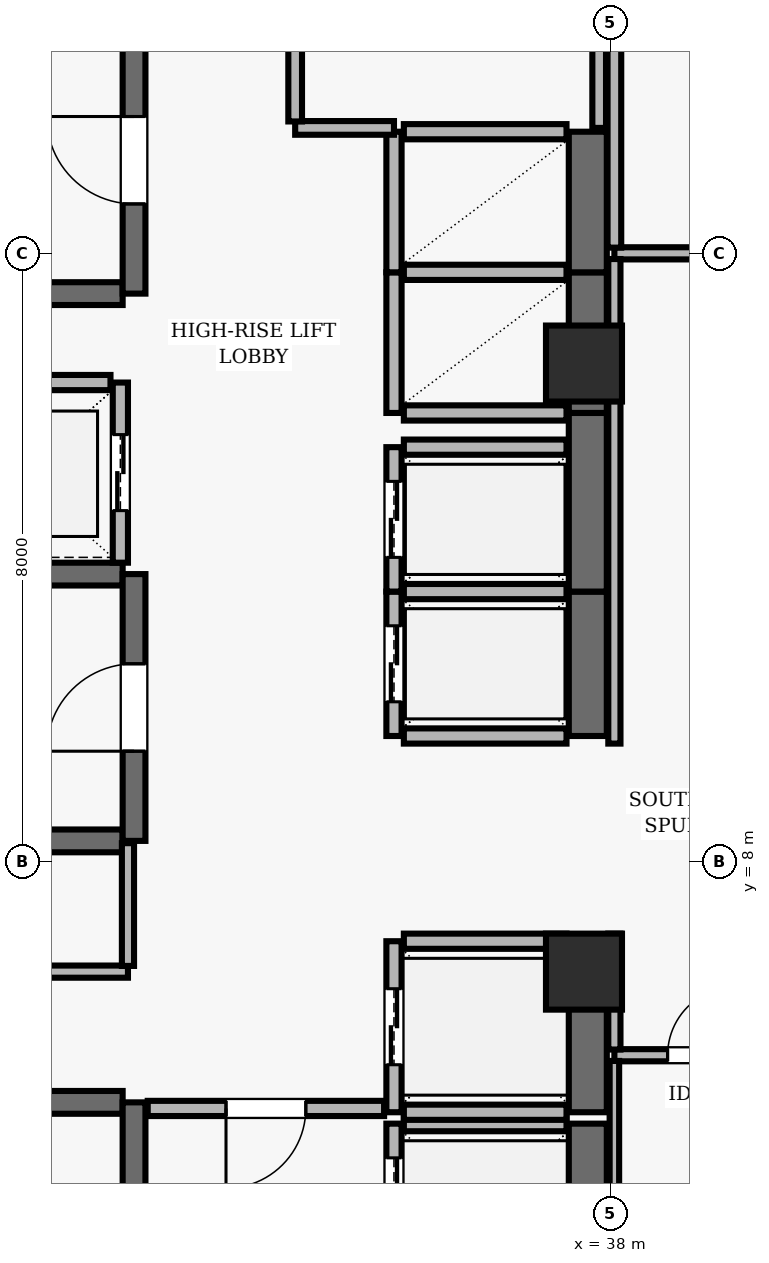
"""IFC4 building model, lengths in metres.
Left out: names, types, materials, properties, quantities, classifications, styles, units other than length and angle.
Written with IfcOpenShell. Run it as: python <this file> out.ifc"""

import sys

from ifc_helpers import new_model, si_unit, direction, frame, frame_2d, origin, origin_2d, place, context, subcontext, project, spatial, rectangle, extrude, element, fill, save


model = new_model("IFC4")
c1 = context("Model", 3, precision=1e-05, world=origin(), true_north=direction((0.0, 1.0)))
c2 = subcontext(c1, "Body", "Model", "MODEL_VIEW")
j1 = project(units=[si_unit("LENGTHUNIT", "METRE"), si_unit("PLANEANGLEUNIT", "RADIAN")], contexts=[c1])
p1 = place(None, origin())
s1 = spatial("IfcSite", under=j1, at=p1, CompositionType="ELEMENT")
p2 = place(p1, origin())
s2 = spatial("IfcBuilding", under=s1, at=p2, CompositionType="ELEMENT")
p3 = place(p2, frame((0.0, 0.0, 222.6)))
s3 = spatial("IfcBuildingStorey", under=s2, at=p3, CompositionType="ELEMENT", Elevation=222.6)
for number, where, z_axis, x_axis in (
    (1, (37.65, 6.55, 0.0), (0.0, 0.0, 1.0), (1.0, 0.0, 0.0)),
    (2, (37.65, 14.55, 0.0), (0.0, 0.0, 1.0), (1.0, 0.0, 0.0)),
):
    element("IfcColumn", number, at=place(p3, frame(where, z_axis=z_axis, x_axis=x_axis)), inside=s3, PredefinedType="COLUMN", context=c2, shape_type="SweptSolid", body=[
        extrude(rectangle(XDim=1.0, YDim=1.0, at=origin_2d()), origin(), (0.0, 0.0, 1.0), 3.9),
    ])
p4 = place(p3, frame((31.58, 4.83, 0.0), z_axis=(0.0, 0.0, 1.0), x_axis=(-1.0, 0.0, 0.0)))
e3 = element("IfcWall", 3, at=p4, inside=s3, PredefinedType="SHEAR", context=c2, shape_type="SweptSolid", body=[
    extrude(rectangle(XDim=8.36, YDim=0.3, at=frame_2d((4.18, 0.0))), origin(), (0.0, 0.0, 1.0), 3.69),
])
p5 = place(p3, frame((31.73, 0.96, 0.0), z_axis=(0.0, 0.0, 1.0), x_axis=(0.0, 1.0, 0.0)))
e4 = element("IfcWall", 4, at=p5, inside=s3, PredefinedType="SHEAR", context=c2, shape_type="SweptSolid", body=[
    extrude(rectangle(XDim=3.87, YDim=0.3, at=frame_2d((1.935, 0.0))), origin(), (0.0, 0.0, 1.0), 3.69),
])
p6 = place(p5, frame((1.54, 0.0, 0.0)))
e5 = element("IfcOpeningElement", 5, at=p6, cuts=e4, PredefinedType="OPENING", context=c2, shape_type="SweptSolid", body=[
    extrude(rectangle(XDim=1.15, YDim=2.15, at=frame_2d((0.575, 1.075))), frame((0.0, 0.16, 0.0), z_axis=(0.0, -1.0, 0.0), x_axis=(1.0, 0.0, 0.0)), (0.0, 0.0, 1.0), 0.32),
])
p7 = place(p3, frame((23.22, 15.47, 0.0), z_axis=(0.0, 0.0, 1.0), x_axis=(1.0, 0.0, 0.0)))
e6 = element("IfcWall", 6, at=p7, inside=s3, PredefinedType="SHEAR", context=c2, shape_type="SweptSolid", body=[
    extrude(rectangle(XDim=8.36, YDim=0.3, at=frame_2d((4.18, 0.0))), origin(), (0.0, 0.0, 1.0), 3.69),
])
p8 = place(p3, frame((31.73, 15.47, 0.0), z_axis=(0.0, 0.0, 1.0), x_axis=(0.0, 1.0, 0.0)))
e7 = element("IfcWall", 7, at=p8, inside=s3, PredefinedType="SHEAR", context=c2, shape_type="SweptSolid", body=[
    extrude(rectangle(XDim=3.51, YDim=0.3, at=frame_2d((1.755, 0.0))), origin(), (0.0, 0.0, 1.0), 3.69),
])
p9 = place(p8, frame((1.18, 0.0, 0.0)))
e8 = element("IfcOpeningElement", 8, at=p9, cuts=e7, PredefinedType="OPENING", context=c2, shape_type="SweptSolid", body=[
    extrude(rectangle(XDim=1.15, YDim=2.15, at=frame_2d((0.575, 1.075))), frame((0.0, 0.16, 0.0), z_axis=(0.0, -1.0, 0.0), x_axis=(1.0, 0.0, 0.0)), (0.0, 0.0, 1.0), 0.32),
])
for number, where, z_axis, x_axis in (
    (9, (31.58, 11.78, 0.0), (0.0, 0.0, 1.0), (-1.0, 0.0, 0.0)),
    (10, (23.22, 8.27, 0.0), (0.0, 0.0, 1.0), (1.0, 0.0, 0.0)),
):
    element("IfcWall", number, at=place(p3, frame(where, z_axis=z_axis, x_axis=x_axis)), inside=s3, PredefinedType="SHEAR", context=c2, shape_type="SweptSolid", body=[
        extrude(rectangle(XDim=8.36, YDim=0.3, at=frame_2d((4.18, 0.0))), origin(), (0.0, 0.0, 1.0), 3.69),
    ])
p10 = place(p3, frame((31.73, 8.27, 0.0), z_axis=(0.0, 0.0, 1.0), x_axis=(0.0, 1.0, 0.0)))
e11 = element("IfcWall", 11, at=p10, inside=s3, PredefinedType="SHEAR", context=c2, shape_type="SweptSolid", body=[
    extrude(rectangle(XDim=3.51, YDim=0.3, at=frame_2d((1.755, 0.0))), origin(), (0.0, 0.0, 1.0), 3.69),
])
p11 = place(p10, frame((1.18, 0.0, 0.0)))
e12 = element("IfcOpeningElement", 12, at=p11, cuts=e11, PredefinedType="OPENING", context=c2, shape_type="SweptSolid", body=[
    extrude(rectangle(XDim=1.15, YDim=2.15, at=frame_2d((0.575, 1.075))), frame((0.0, 0.16, 0.0), z_axis=(0.0, -1.0, 0.0), x_axis=(1.0, 0.0, 0.0)), (0.0, 0.0, 1.0), 0.32),
])
p12 = place(p3, frame((35.15, 4.55, 0.0), z_axis=(0.0, 0.0, 1.0), x_axis=(0.0, -1.0, 0.0)))
e13 = element("IfcWall", 13, at=p12, inside=s3, PredefinedType="SOLIDWALL", context=c2, shape_type="SweptSolid", body=[
    extrude(rectangle(XDim=2.1, YDim=0.2, at=frame_2d((1.05, 0.0))), origin(), (0.0, 0.0, 1.0), 3.69),
])
p13 = place(p12, frame((0.45, 0.0, 0.0)))
e14 = element("IfcOpeningElement", 14, at=p13, cuts=e13, PredefinedType="OPENING", context=c2, shape_type="SweptSolid", body=[
    extrude(rectangle(XDim=1.2, YDim=2.15, at=frame_2d((0.6, 1.075))), frame((0.0, 0.11, 0.0), z_axis=(0.0, -1.0, 0.0), x_axis=(1.0, 0.0, 0.0)), (0.0, 0.0, 1.0), 0.22),
])
p14 = place(p3, frame((37.7, 2.45, 0.0), z_axis=(0.0, 0.0, 1.0), x_axis=(0.0, 1.0, 0.0)))
e15 = element("IfcWall", 15, at=p14, inside=s3, PredefinedType="SHEAR", context=c2, shape_type="SweptSolid", body=[
    extrude(rectangle(XDim=2.1, YDim=0.5, at=frame_2d((1.05, 0.0))), origin(), (0.0, 0.0, 1.0), 3.69),
])
p15 = place(p3, frame((37.42, 4.55, 0.0), z_axis=(0.0, 0.0, 1.0), x_axis=(-1.0, 0.0, 0.0)))
e16 = element("IfcWall", 16, at=p15, inside=s3, PredefinedType="SOLIDWALL", context=c2, shape_type="SweptSolid", body=[
    extrude(rectangle(XDim=2.14, YDim=0.2, at=frame_2d((1.07, 0.0))), origin(), (0.0, 0.0, 1.0), 3.69),
])
p16 = place(p3, frame((35.15, 6.95, 0.0), z_axis=(0.0, 0.0, 1.0), x_axis=(0.0, -1.0, 0.0)))
e17 = element("IfcWall", 17, at=p16, inside=s3, PredefinedType="SOLIDWALL", context=c2, shape_type="SweptSolid", body=[
    extrude(rectangle(XDim=2.25, YDim=0.2, at=frame_2d((1.125, 0.0))), origin(), (0.0, 0.0, 1.0), 3.69),
])
p17 = place(p16, frame((0.625, 0.0, 0.0)))
e18 = element("IfcOpeningElement", 18, at=p17, cuts=e17, PredefinedType="OPENING", context=c2, shape_type="SweptSolid", body=[
    extrude(rectangle(XDim=1.0, YDim=2.1, at=frame_2d((0.5, 1.05))), frame((0.0, 0.11, 0.0), z_axis=(0.0, -1.0, 0.0), x_axis=(1.0, 0.0, 0.0)), (0.0, 0.0, 1.0), 0.22),
])
p18 = place(p3, frame((37.7, 4.7, 0.0), z_axis=(0.0, 0.0, 1.0), x_axis=(0.0, 1.0, 0.0)))
e19 = element("IfcWall", 19, at=p18, inside=s3, PredefinedType="SHEAR", context=c2, shape_type="SweptSolid", body=[
    extrude(rectangle(XDim=2.25, YDim=0.5, at=frame_2d((1.125, 0.0))), origin(), (0.0, 0.0, 1.0), 3.69),
])
for number, where, z_axis, x_axis in (
    (20, (35.28, 4.7, 0.0), (0.0, 0.0, 1.0), (1.0, 0.0, 0.0)),
    (21, (37.42, 6.95, 0.0), (0.0, 0.0, 1.0), (-1.0, 0.0, 0.0)),
):
    element("IfcWall", number, at=place(p3, frame(where, z_axis=z_axis, x_axis=x_axis)), inside=s3, PredefinedType="SOLIDWALL", context=c2, shape_type="SweptSolid", body=[
        extrude(rectangle(XDim=2.14, YDim=0.2, at=frame_2d((1.07, 0.0))), origin(), (0.0, 0.0, 1.0), 3.69),
    ])
p19 = place(p3, frame((35.15, 11.55, 0.0), z_axis=(0.0, 0.0, 1.0), x_axis=(0.0, -1.0, 0.0)))
e22 = element("IfcWall", 22, at=p19, inside=s3, PredefinedType="SOLIDWALL", context=c2, shape_type="SweptSolid", body=[
    extrude(rectangle(XDim=1.9, YDim=0.2, at=frame_2d((0.95, 0.0))), origin(), (0.0, 0.0, 1.0), 3.69),
])
p20 = place(p19, frame((0.45, 0.0, 0.0)))
e23 = element("IfcOpeningElement", 23, at=p20, cuts=e22, PredefinedType="OPENING", context=c2, shape_type="SweptSolid", body=[
    extrude(rectangle(XDim=1.0, YDim=2.1, at=frame_2d((0.5, 1.05))), frame((0.0, 0.11, 0.0), z_axis=(0.0, -1.0, 0.0), x_axis=(1.0, 0.0, 0.0)), (0.0, 0.0, 1.0), 0.22),
])
p21 = place(p3, frame((37.7, 9.65, 0.0), z_axis=(0.0, 0.0, 1.0), x_axis=(0.0, 1.0, 0.0)))
e24 = element("IfcWall", 24, at=p21, inside=s3, PredefinedType="SHEAR", context=c2, shape_type="SweptSolid", body=[
    extrude(rectangle(XDim=1.9, YDim=0.5, at=frame_2d((0.95, 0.0))), origin(), (0.0, 0.0, 1.0), 3.69),
])
for number, where, z_axis, x_axis in (
    (25, (35.28, 9.65, 0.0), (0.0, 0.0, 1.0), (1.0, 0.0, 0.0)),
    (26, (37.42, 11.55, 0.0), (0.0, 0.0, 1.0), (-1.0, 0.0, 0.0)),
):
    element("IfcWall", number, at=place(p3, frame(where, z_axis=z_axis, x_axis=x_axis)), inside=s3, PredefinedType="SOLIDWALL", context=c2, shape_type="SweptSolid", body=[
        extrude(rectangle(XDim=2.14, YDim=0.2, at=frame_2d((1.07, 0.0))), origin(), (0.0, 0.0, 1.0), 3.69),
    ])
p22 = place(p3, frame((35.15, 13.45, 0.0), z_axis=(0.0, 0.0, 1.0), x_axis=(0.0, -1.0, 0.0)))
e27 = element("IfcWall", 27, at=p22, inside=s3, PredefinedType="SOLIDWALL", context=c2, shape_type="SweptSolid", body=[
    extrude(rectangle(XDim=1.9, YDim=0.2, at=frame_2d((0.95, 0.0))), origin(), (0.0, 0.0, 1.0), 3.69),
])
p23 = place(p22, frame((0.45, 0.0, 0.0)))
e28 = element("IfcOpeningElement", 28, at=p23, cuts=e27, PredefinedType="OPENING", context=c2, shape_type="SweptSolid", body=[
    extrude(rectangle(XDim=1.0, YDim=2.1, at=frame_2d((0.5, 1.05))), frame((0.0, 0.11, 0.0), z_axis=(0.0, -1.0, 0.0), x_axis=(1.0, 0.0, 0.0)), (0.0, 0.0, 1.0), 0.22),
])
p24 = place(p3, frame((37.7, 11.55, 0.0), z_axis=(0.0, 0.0, 1.0), x_axis=(0.0, 1.0, 0.0)))
e29 = element("IfcWall", 29, at=p24, inside=s3, PredefinedType="SHEAR", context=c2, shape_type="SweptSolid", body=[
    extrude(rectangle(XDim=2.35, YDim=0.5, at=frame_2d((1.175, 0.0))), origin(), (0.0, 0.0, 1.0), 3.69),
])
p25 = place(p3, frame((37.42, 13.45, 0.0), z_axis=(0.0, 0.0, 1.0), x_axis=(-1.0, 0.0, 0.0)))
e30 = element("IfcWall", 30, at=p25, inside=s3, PredefinedType="SOLIDWALL", context=c2, shape_type="SweptSolid", body=[
    extrude(rectangle(XDim=2.14, YDim=0.2, at=frame_2d((1.07, 0.0))), origin(), (0.0, 0.0, 1.0), 3.69),
])
p26 = place(p3, frame((31.55, 11.93, 0.0), z_axis=(0.0, 0.0, 1.0), x_axis=(0.0, 1.0, 0.0)))
e31 = element("IfcWall", 31, at=p26, inside=s3, PredefinedType="SOLIDWALL", context=c2, shape_type="SweptSolid", body=[
    extrude(rectangle(XDim=2.37, YDim=0.2, at=frame_2d((1.185, 0.0))), origin(), (0.0, 0.0, 1.0), 3.69),
])
p27 = place(p26, frame((0.685, 0.0, 0.0)))
e32 = element("IfcOpeningElement", 32, at=p27, cuts=e31, PredefinedType="OPENING", context=c2, shape_type="SweptSolid", body=[
    extrude(rectangle(XDim=1.0, YDim=2.1, at=frame_2d((0.5, 1.05))), frame((0.0, 0.11, 0.0), z_axis=(0.0, -1.0, 0.0), x_axis=(1.0, 0.0, 0.0)), (0.0, 0.0, 1.0), 0.22),
])
p28 = place(p3, frame((31.42, 14.3, 0.0), z_axis=(0.0, 0.0, 1.0), x_axis=(-1.0, 0.0, 0.0)))
e33 = element("IfcWall", 33, at=p28, inside=s3, PredefinedType="SOLIDWALL", context=c2, shape_type="SweptSolid", body=[
    extrude(rectangle(XDim=2.44, YDim=0.2, at=frame_2d((1.22, 0.0))), origin(), (0.0, 0.0, 1.0), 3.69),
])
p29 = place(p3, frame((35.15, 15.75, 0.0), z_axis=(0.0, 0.0, 1.0), x_axis=(0.0, -1.0, 0.0)))
e34 = element("IfcWall", 34, at=p29, inside=s3, PredefinedType="SOLIDWALL", context=c2, shape_type="SweptSolid", body=[
    extrude(rectangle(XDim=1.85, YDim=0.2, at=frame_2d((0.925, 0.0))), origin(), (0.0, 0.0, 1.0), 3.69),
])
p30 = place(p3, frame((37.7, 13.9, 0.0), z_axis=(0.0, 0.0, 1.0), x_axis=(0.0, 1.0, 0.0)))
e35 = element("IfcWall", 35, at=p30, inside=s3, PredefinedType="SHEAR", context=c2, shape_type="SweptSolid", body=[
    extrude(rectangle(XDim=1.85, YDim=0.5, at=frame_2d((0.925, 0.0))), origin(), (0.0, 0.0, 1.0), 3.69),
])
for number, where, z_axis, x_axis in (
    (36, (35.28, 13.9, 0.0), (0.0, 0.0, 1.0), (1.0, 0.0, 0.0)),
    (37, (37.42, 15.75, 0.0), (0.0, 0.0, 1.0), (-1.0, 0.0, 0.0)),
):
    element("IfcWall", number, at=place(p3, frame(where, z_axis=z_axis, x_axis=x_axis)), inside=s3, PredefinedType="SOLIDWALL", context=c2, shape_type="SweptSolid", body=[
        extrude(rectangle(XDim=2.14, YDim=0.2, at=frame_2d((1.07, 0.0))), origin(), (0.0, 0.0, 1.0), 3.69),
    ])
p31 = place(p3, frame((35.15, 17.6, 0.0), z_axis=(0.0, 0.0, 1.0), x_axis=(0.0, -1.0, 0.0)))
e38 = element("IfcWall", 38, at=p31, inside=s3, PredefinedType="SOLIDWALL", context=c2, shape_type="SweptSolid", body=[
    extrude(rectangle(XDim=1.85, YDim=0.2, at=frame_2d((0.925, 0.0))), origin(), (0.0, 0.0, 1.0), 3.69),
])
p32 = place(p3, frame((37.7, 15.75, 0.0), z_axis=(0.0, 0.0, 1.0), x_axis=(0.0, 1.0, 0.0)))
e39 = element("IfcWall", 39, at=p32, inside=s3, PredefinedType="SHEAR", context=c2, shape_type="SweptSolid", body=[
    extrude(rectangle(XDim=1.85, YDim=0.5, at=frame_2d((0.925, 0.0))), origin(), (0.0, 0.0, 1.0), 3.69),
])
p33 = place(p3, frame((37.42, 17.6, 0.0), z_axis=(0.0, 0.0, 1.0), x_axis=(-1.0, 0.0, 0.0)))
e40 = element("IfcWall", 40, at=p33, inside=s3, PredefinedType="SOLIDWALL", context=c2, shape_type="SweptSolid", body=[
    extrude(rectangle(XDim=2.14, YDim=0.2, at=frame_2d((1.07, 0.0))), origin(), (0.0, 0.0, 1.0), 3.69),
])
p34 = place(p3, frame((31.65, 6.55, 0.0), z_axis=(0.0, 0.0, 1.0), x_axis=(-1.0, 0.0, 0.0)))
e41 = element("IfcWall", 41, at=p34, inside=s3, PredefinedType="PARTITIONING", context=c2, shape_type="SweptSolid", body=[
    extrude(rectangle(XDim=4.75, YDim=0.16, at=frame_2d((2.375, 0.0))), origin(), (0.0, 0.0, 1.0), 3.69),
])
p35 = place(p34, frame((1.935, 0.0, 0.0)))
e42 = element("IfcOpeningElement", 42, at=p35, cuts=e41, PredefinedType="OPENING", context=c2, shape_type="SweptSolid", body=[
    extrude(rectangle(XDim=0.88, YDim=2.1, at=frame_2d((0.44, 1.05))), frame((0.0, 0.09, 0.0), z_axis=(0.0, -1.0, 0.0), x_axis=(1.0, 0.0, 0.0)), (0.0, 0.0, 1.0), 0.18),
])
p36 = place(p3, frame((33.85, 17.65, 0.0), z_axis=(0.0, 0.0, 1.0), x_axis=(1.0, 0.0, 0.0)))
e43 = element("IfcWall", 43, at=p36, inside=s3, PredefinedType="PARTITIONING", context=c2, shape_type="SweptSolid", body=[
    extrude(rectangle(XDim=1.3, YDim=0.18, at=frame_2d((0.65, 0.0))), origin(), (0.0, 0.0, 1.0), 3.69),
])
p37 = place(p3, frame((35.02, 4.75, 0.0), z_axis=(0.0, 0.0, 1.0), x_axis=(-1.0, 0.0, 0.0)))
e44 = element("IfcWall", 44, at=p37, inside=s3, PredefinedType="SOLIDWALL", context=c2, shape_type="SweptSolid", body=[
    extrude(rectangle(XDim=3.11, YDim=0.2, at=frame_2d((1.555, 0.0))), origin(), (0.0, 0.0, 1.0), 3.69),
])
p38 = place(p37, frame((1.03, 0.0, 0.0)))
e45 = element("IfcOpeningElement", 45, at=p38, cuts=e44, PredefinedType="OPENING", context=c2, shape_type="SweptSolid", body=[
    extrude(rectangle(XDim=1.05, YDim=2.15, at=frame_2d((0.525, 1.075))), frame((0.0, 0.11, 0.0), z_axis=(0.0, -1.0, 0.0), x_axis=(1.0, 0.0, 0.0)), (0.0, 0.0, 1.0), 0.22),
])
p39 = place(p3, frame((38.05, 5.45, 0.0), z_axis=(0.0, 0.0, 1.0), x_axis=(1.0, 0.0, 0.0)))
e46 = element("IfcWall", 46, at=p39, inside=s3, PredefinedType="PARTITIONING", context=c2, shape_type="SweptSolid", body=[
    extrude(rectangle(XDim=2.3, YDim=0.16, at=frame_2d((1.15, 0.0))), origin(), (0.0, 0.0, 1.0), 3.343),
])
p40 = place(p39, frame((0.7, 0.0, 0.0)))
e47 = element("IfcOpeningElement", 47, at=p40, cuts=e46, PredefinedType="OPENING", context=c2, shape_type="SweptSolid", body=[
    extrude(rectangle(XDim=0.9, YDim=2.1, at=frame_2d((0.45, 1.05))), frame((0.0, 0.09, 0.0), z_axis=(0.0, -1.0, 0.0), x_axis=(1.0, 0.0, 0.0)), (0.0, 0.0, 1.0), 0.18),
])
p41 = place(p3, frame((40.35, 16.0, 0.0), z_axis=(0.0, 0.0, 1.0), x_axis=(-1.0, 0.0, 0.0)))
e48 = element("IfcWall", 48, at=p41, inside=s3, PredefinedType="PARTITIONING", context=c2, shape_type="SweptSolid", body=[
    extrude(rectangle(XDim=2.3, YDim=0.16, at=frame_2d((1.15, 0.0))), origin(), (0.0, 0.0, 1.0), 3.39),
])
p42 = place(p41, frame((0.35, 0.0, 0.0)))
e49 = element("IfcOpeningElement", 49, at=p42, cuts=e48, PredefinedType="OPENING", context=c2, shape_type="SweptSolid", body=[
    extrude(rectangle(XDim=0.9, YDim=2.1, at=frame_2d((0.45, 1.05))), frame((0.0, 0.09, 0.0), z_axis=(0.0, -1.0, 0.0), x_axis=(1.0, 0.0, 0.0)), (0.0, 0.0, 1.0), 0.18),
])
p43 = place(p3, frame((31.65, 8.24, 0.0), z_axis=(0.0, 0.0, 1.0), x_axis=(0.0, -1.0, 0.0)))
e50 = element("IfcWall", 50, at=p43, inside=s3, PredefinedType="PARTITIONING", context=c2, shape_type="SweptSolid", body=[
    extrude(rectangle(XDim=1.615, YDim=0.16, at=frame_2d((0.808, 0.0))), origin(), (0.0, 0.0, 1.0), 3.69),
])
p44 = place(p3, frame((33.85, 17.735, 0.0), z_axis=(0.0, 0.0, 1.0), x_axis=(0.0, 1.0, 0.0)))
e51 = element("IfcWall", 51, at=p44, inside=s3, PredefinedType="PARTITIONING", context=c2, shape_type="SweptSolid", body=[
    extrude(rectangle(XDim=2.93, YDim=0.18, at=frame_2d((1.465, 0.0))), origin(), (0.0, 0.0, 1.0), 3.69),
])
p45 = place(p44, frame((0.99, 0.0, 0.0)))
e52 = element("IfcOpeningElement", 52, at=p45, cuts=e51, PredefinedType="OPENING", context=c2, shape_type="SweptSolid", body=[
    extrude(rectangle(XDim=0.95, YDim=2.1, at=frame_2d((0.475, 1.05))), frame((0.0, 0.1, 0.0), z_axis=(0.0, -1.0, 0.0), x_axis=(1.0, 0.0, 0.0)), (0.0, 0.0, 1.0), 0.2),
])
p46 = place(p3, frame((37.85, 17.65, 0.0), z_axis=(0.0, 0.0, 1.0), x_axis=(0.0, 1.0, 0.0)))
e53 = element("IfcWall", 53, at=p46, inside=s3, PredefinedType="PARTITIONING", context=c2, shape_type="SweptSolid", body=[
    extrude(rectangle(XDim=3.015, YDim=0.18, at=frame_2d((1.508, 0.0))), origin(), (0.0, 0.0, 1.0), 3.139),
])
p47 = place(p3, frame((38.05, 5.375, 0.0), z_axis=(0.0, 0.0, 1.0), x_axis=(0.0, -1.0, 0.0)))
e54 = element("IfcWall", 54, at=p47, inside=s3, PredefinedType="PARTITIONING", context=c2, shape_type="SweptSolid", body=[
    extrude(rectangle(XDim=5.23, YDim=0.125, at=frame_2d((2.615, 0.0))), origin(), (0.0, 0.0, 1.0), 3.139),
])
p48 = place(p3, frame((38.05, 7.05, 0.0), z_axis=(0.0, 0.0, 1.0), x_axis=(0.0, -1.0, 0.0)))
e55 = element("IfcWall", 55, at=p48, inside=s3, PredefinedType="PARTITIONING", context=c2, shape_type="SweptSolid", body=[
    extrude(rectangle(XDim=1.525, YDim=0.16, at=frame_2d((0.763, 0.0))), origin(), (0.0, 0.0, 1.0), 3.139),
])
p49 = place(p3, frame((38.05, 15.925, 0.0), z_axis=(0.0, 0.0, 1.0), x_axis=(0.0, -1.0, 0.0)))
e56 = element("IfcWall", 56, at=p49, inside=s3, PredefinedType="PARTITIONING", context=c2, shape_type="SweptSolid", body=[
    extrude(rectangle(XDim=6.375, YDim=0.16, at=frame_2d((3.188, 0.0))), origin(), (0.0, 0.0, 1.0), 3.139),
])
p50 = place(p3, frame((38.05, 22.055, 0.0), z_axis=(0.0, 0.0, 1.0), x_axis=(0.0, -1.0, 0.0)))
e57 = element("IfcWall", 57, at=p50, inside=s3, PredefinedType="PARTITIONING", context=c2, shape_type="SweptSolid", body=[
    extrude(rectangle(XDim=5.98, YDim=0.18, at=frame_2d((2.99, 0.0))), origin(), (0.0, 0.0, 1.0), 3.139),
])
p51 = place(p9, origin())
e58 = element("IfcDoor", 58, at=p51, inside=s3, OperationType="SINGLE_SWING_RIGHT", PredefinedType="DOOR", context=c2, shape_type="SweptSolid", body=[
    extrude(rectangle(XDim=1.15, YDim=2.15, at=frame_2d((0.575, 1.075))), frame((0.0, 0.025, 0.0), z_axis=(0.0, -1.0, 0.0), x_axis=(1.0, 0.0, 0.0)), (0.0, 0.0, 1.0), 0.05),
])
fill(e8, e58)
p52 = place(p11, origin())
e59 = element("IfcDoor", 59, at=p52, inside=s3, OperationType="SINGLE_SWING_LEFT", PredefinedType="DOOR", context=c2, shape_type="SweptSolid", body=[
    extrude(rectangle(XDim=1.15, YDim=2.15, at=frame_2d((0.575, 1.075))), frame((0.0, 0.025, 0.0), z_axis=(0.0, -1.0, 0.0), x_axis=(1.0, 0.0, 0.0)), (0.0, 0.0, 1.0), 0.05),
])
fill(e12, e59)
p53 = place(p13, origin())
e60 = element("IfcDoor", 60, at=p53, inside=s3, OperationType="DOUBLE_DOOR_SLIDING", PredefinedType="DOOR", context=c2, shape_type="SweptSolid", body=[
    extrude(rectangle(XDim=1.2, YDim=2.15, at=frame_2d((0.6, 1.075))), frame((0.0, 0.025, 0.0), z_axis=(0.0, -1.0, 0.0), x_axis=(1.0, 0.0, 0.0)), (0.0, 0.0, 1.0), 0.05),
])
fill(e14, e60)
p54 = place(p17, origin())
e61 = element("IfcDoor", 61, at=p54, inside=s3, OperationType="DOUBLE_DOOR_SLIDING", PredefinedType="DOOR", context=c2, shape_type="SweptSolid", body=[
    extrude(rectangle(XDim=1.0, YDim=2.1, at=frame_2d((0.5, 1.05))), frame((0.0, 0.025, 0.0), z_axis=(0.0, -1.0, 0.0), x_axis=(1.0, 0.0, 0.0)), (0.0, 0.0, 1.0), 0.05),
])
fill(e18, e61)
p55 = place(p20, origin())
e62 = element("IfcDoor", 62, at=p55, inside=s3, OperationType="DOUBLE_DOOR_SLIDING", PredefinedType="DOOR", context=c2, shape_type="SweptSolid", body=[
    extrude(rectangle(XDim=1.0, YDim=2.1, at=frame_2d((0.5, 1.05))), frame((0.0, 0.025, 0.0), z_axis=(0.0, -1.0, 0.0), x_axis=(1.0, 0.0, 0.0)), (0.0, 0.0, 1.0), 0.05),
])
fill(e23, e62)
p56 = place(p23, origin())
e63 = element("IfcDoor", 63, at=p56, inside=s3, OperationType="DOUBLE_DOOR_SLIDING", PredefinedType="DOOR", context=c2, shape_type="SweptSolid", body=[
    extrude(rectangle(XDim=1.0, YDim=2.1, at=frame_2d((0.5, 1.05))), frame((0.0, 0.025, 0.0), z_axis=(0.0, -1.0, 0.0), x_axis=(1.0, 0.0, 0.0)), (0.0, 0.0, 1.0), 0.05),
])
fill(e28, e63)
p57 = place(p27, origin())
e64 = element("IfcDoor", 64, at=p57, inside=s3, OperationType="DOUBLE_DOOR_SLIDING", PredefinedType="DOOR", context=c2, shape_type="SweptSolid", body=[
    extrude(rectangle(XDim=1.0, YDim=2.1, at=frame_2d((0.5, 1.05))), frame((0.0, 0.025, 0.0), z_axis=(0.0, -1.0, 0.0), x_axis=(1.0, 0.0, 0.0)), (0.0, 0.0, 1.0), 0.05),
])
fill(e32, e64)
p58 = place(p38, origin())
e65 = element("IfcDoor", 65, at=p58, inside=s3, OperationType="SINGLE_SWING_RIGHT", PredefinedType="DOOR", context=c2, shape_type="SweptSolid", body=[
    extrude(rectangle(XDim=1.05, YDim=2.15, at=frame_2d((0.525, 1.075))), frame((0.0, 0.025, 0.0), z_axis=(0.0, -1.0, 0.0), x_axis=(1.0, 0.0, 0.0)), (0.0, 0.0, 1.0), 0.05),
])
fill(e45, e65)
p59 = place(p40, origin())
e66 = element("IfcDoor", 66, at=p59, inside=s3, OperationType="SINGLE_SWING_RIGHT", PredefinedType="DOOR", context=c2, shape_type="SweptSolid", body=[
    extrude(rectangle(XDim=0.9, YDim=2.1, at=frame_2d((0.45, 1.05))), frame((0.0, 0.025, 0.0), z_axis=(0.0, -1.0, 0.0), x_axis=(1.0, 0.0, 0.0)), (0.0, 0.0, 1.0), 0.05),
])
fill(e47, e66)
save(model, sys.argv[1])
